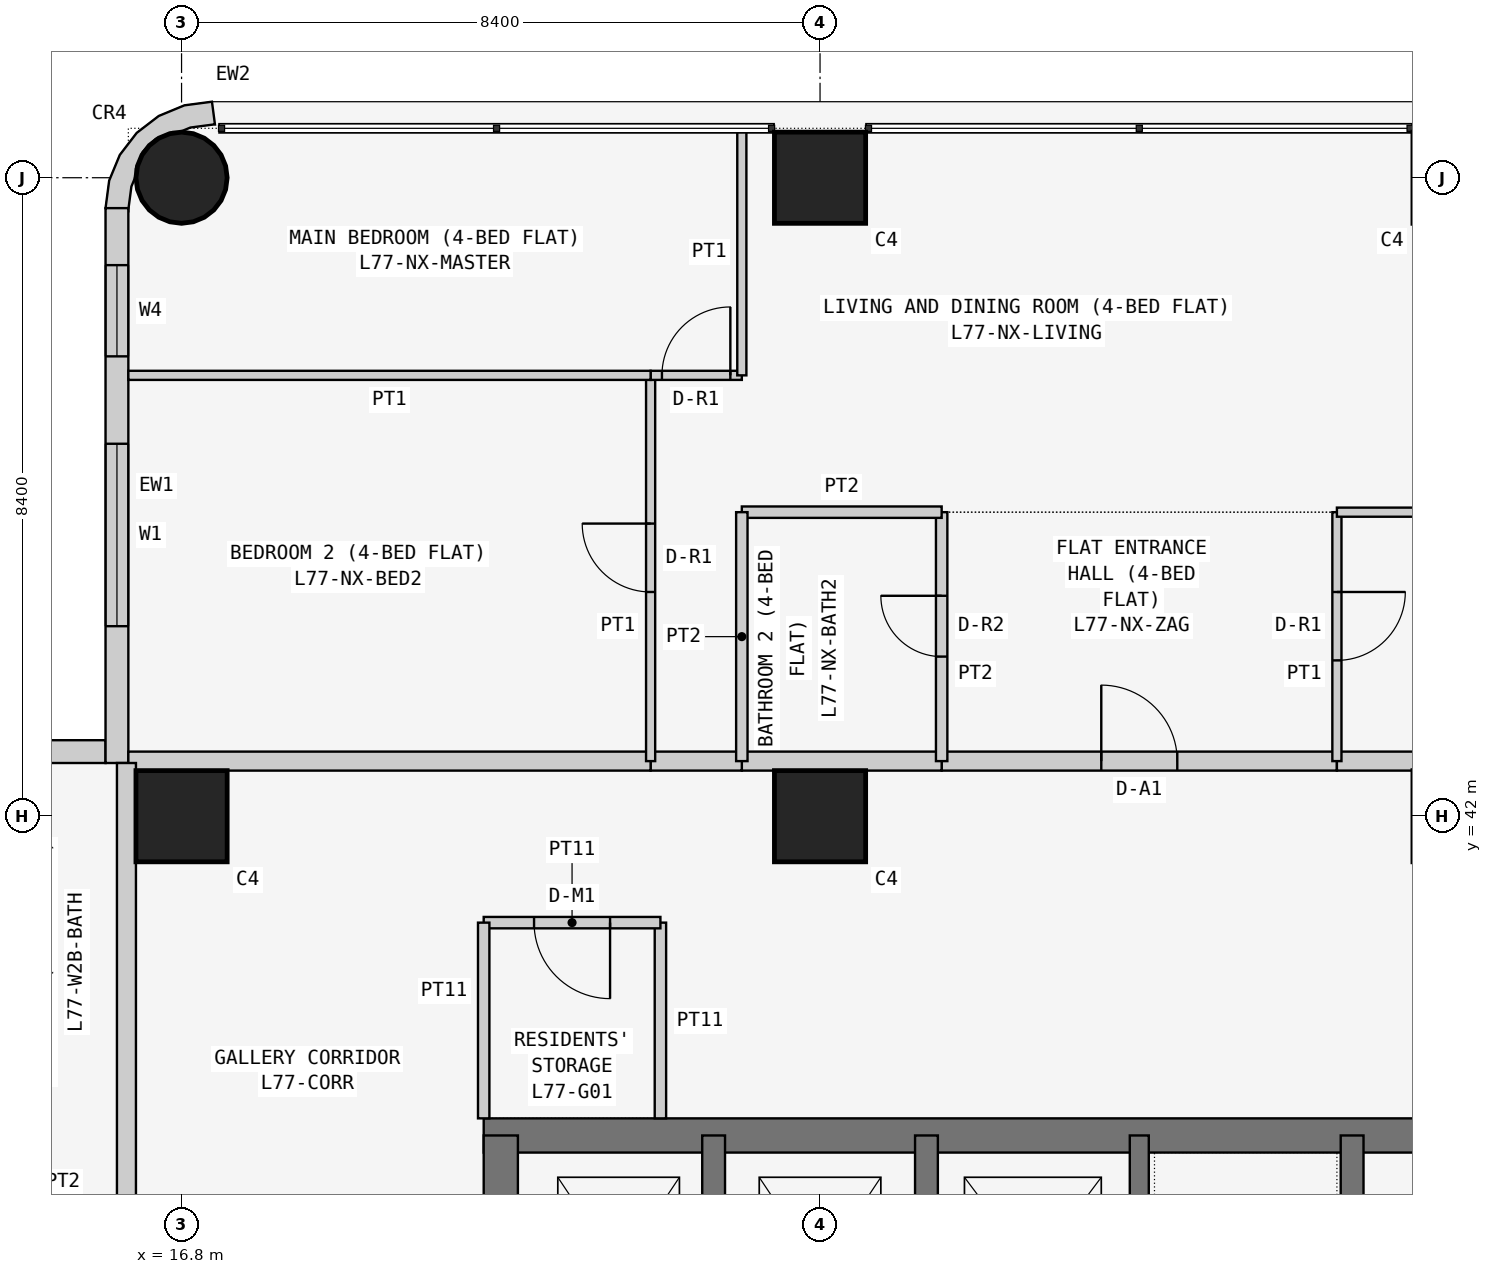
"""IFC4 building model, lengths in metres.
Left out: names, types, materials, properties, quantities, classifications, styles, units other than length and angle.
Written with IfcOpenShell. Run it as: python <this file> out.ifc"""

import sys

from ifc_helpers import new_model, si_unit, direction, frame, frame_2d, origin, origin_2d, place, context, subcontext, project, spatial, polyline, rectangle, circle, outline, extrude, element, fill, save


model = new_model("IFC4")
c1 = context("Model", 3, precision=1e-05, world=origin(), true_north=direction((0.0, 1.0)))
c2 = subcontext(c1, "Body", "Model", "MODEL_VIEW")
j1 = project(units=[si_unit("LENGTHUNIT", "METRE"), si_unit("PLANEANGLEUNIT", "RADIAN")], contexts=[c1])
p1 = place(None, origin())
s1 = spatial("IfcSite", under=j1, at=p1, CompositionType="ELEMENT")
p2 = place(p1, origin())
s2 = spatial("IfcBuilding", under=s1, at=p2, CompositionType="ELEMENT")
p3 = place(p2, frame((0.0, 0.0, 293.7)))
s3 = spatial("IfcBuildingStorey", under=s2, at=p3, CompositionType="ELEMENT", Elevation=293.7)
p4 = place(p3, frame((16.8, 42.0, 0.0), z_axis=(0.0, 0.0, 1.0), x_axis=(1.0, 0.0, 0.0)))
e1 = element("IfcColumn", 1, at=p4, inside=s3, PredefinedType="COLUMN", context=c2, shape_type="SweptSolid", body=[
    extrude(rectangle(XDim=1.2, YDim=1.2, at=origin_2d()), origin(), (0.0, 0.0, 1.0), 3.6),
])
p5 = place(p3, frame((16.8, 50.4, 0.0), z_axis=(0.0, 0.0, 1.0), x_axis=(1.0, 0.0, 0.0)))
e2 = element("IfcColumn", 2, at=p5, inside=s3, PredefinedType="COLUMN", context=c2, shape_type="SweptSolid", body=[
    extrude(circle(Radius=0.6, at=origin_2d()), origin(), (0.0, 0.0, 1.0), 3.6),
])
for number, where, z_axis, x_axis in (
    (3, (25.2, 42.0, 0.0), (0.0, 0.0, 1.0), (1.0, 0.0, 0.0)),
    (4, (25.2, 50.4, 0.0), (0.0, 0.0, 1.0), (1.0, 0.0, 0.0)),
):
    element("IfcColumn", number, at=place(p3, frame(where, z_axis=z_axis, x_axis=x_axis)), inside=s3, PredefinedType="COLUMN", context=c2, shape_type="SweptSolid", body=[
        extrude(rectangle(XDim=1.2, YDim=1.2, at=origin_2d()), origin(), (0.0, 0.0, 1.0), 3.6),
    ])
p6 = place(p3, frame((37.8, 37.8, 0.0), z_axis=(0.0, 0.0, 1.0), x_axis=(-1.0, 0.0, 0.0)))
e5 = element("IfcWall", 5, at=p6, inside=s3, PredefinedType="SHEAR", context=c2, shape_type="SweptSolid", body=[
    extrude(rectangle(XDim=17.025, YDim=0.45, at=frame_2d((8.513, 0.0))), origin(), (0.0, 0.0, 1.0), 3.6),
])
p7 = place(p3, frame((21.0, 37.8, 0.0), z_axis=(0.0, 0.0, 1.0), x_axis=(0.0, -1.0, 0.0)))
e6 = element("IfcWall", 6, at=p7, inside=s3, PredefinedType="SHEAR", context=c2, shape_type="SweptSolid", body=[
    extrude(rectangle(XDim=17.025, YDim=0.45, at=frame_2d((8.513, 0.0))), origin(), (0.0, 0.0, 1.0), 3.6),
])
p8 = place(p7, frame((5.4, 0.0, 0.0)))
e7 = element("IfcOpeningElement", 7, at=p8, cuts=e6, PredefinedType="OPENING", context=c2, shape_type="SweptSolid", body=[
    extrude(rectangle(XDim=1.2, YDim=2.1, at=frame_2d((0.6, 1.05))), frame((0.0, 0.235, 0.0), z_axis=(0.0, -1.0, 0.0), x_axis=(1.0, 0.0, 0.0)), (0.0, 0.0, 1.0), 0.47),
])
p9 = place(p3, frame((26.6, 21.0, 0.0), z_axis=(0.0, 0.0, 1.0), x_axis=(0.0, 1.0, 0.0)))
e8 = element("IfcWall", 8, at=p9, inside=s3, PredefinedType="SHEAR", context=c2, shape_type="SweptSolid", body=[
    extrude(rectangle(XDim=16.8, YDim=0.3, at=frame_2d((8.4, 0.0))), origin(), (0.0, 0.0, 1.0), 3.6),
])
p10 = place(p9, frame((10.4, 0.0, 0.0)))
e9 = element("IfcOpeningElement", 9, at=p10, cuts=e8, PredefinedType="OPENING", context=c2, shape_type="SweptSolid", body=[
    extrude(rectangle(XDim=1.2, YDim=2.1, at=frame_2d((0.6, 1.05))), frame((0.0, 0.16, 0.0), z_axis=(0.0, -1.0, 0.0), x_axis=(1.0, 0.0, 0.0)), (0.0, 0.0, 1.0), 0.32),
])
p11 = place(p3, frame((23.8, 34.6, 0.0), z_axis=(0.0, 0.0, 1.0), x_axis=(0.0, 1.0, 0.0)))
e10 = element("IfcWall", 10, at=p11, inside=s3, PredefinedType="SHEAR", context=c2, shape_type="SweptSolid", body=[
    extrude(rectangle(XDim=3.2, YDim=0.3, at=frame_2d((1.6, 0.0))), origin(), (0.0, 0.0, 1.0), 3.6),
])
p12 = place(p3, frame((32.2, 29.25, 0.0), z_axis=(0.0, 0.0, 1.0), x_axis=(0.0, 1.0, 0.0)))
e11 = element("IfcWall", 11, at=p12, inside=s3, PredefinedType="SHEAR", context=c2, shape_type="SweptSolid", body=[
    extrude(rectangle(XDim=8.55, YDim=0.3, at=frame_2d((4.275, 0.0))), origin(), (0.0, 0.0, 1.0), 3.6),
])
p13 = place(p3, frame((29.4, 34.6, 0.0), z_axis=(0.0, 0.0, 1.0), x_axis=(0.0, 1.0, 0.0)))
e12 = element("IfcWall", 12, at=p13, inside=s3, PredefinedType="SHEAR", context=c2, shape_type="SweptSolid", body=[
    extrude(rectangle(XDim=3.2, YDim=0.25, at=frame_2d((1.6, 0.0))), origin(), (0.0, 0.0, 1.0), 3.6),
])
p14 = place(p3, frame((15.8, 42.85, 0.0), z_axis=(0.0, 0.0, 1.0), x_axis=(-1.0, 0.0, 0.0)))
e13 = element("IfcWall", 13, at=p14, inside=s3, PredefinedType="SOLIDWALL", context=c2, shape_type="SweptSolid", body=[
    extrude(rectangle(XDim=7.0, YDim=0.3, at=frame_2d((3.5, 0.0))), origin(), (0.0, 0.0, 1.0), 3.45),
])
p15 = place(p14, frame((1.5, 0.0, 0.9)))
e14 = element("IfcOpeningElement", 14, at=p15, cuts=e13, PredefinedType="OPENING", context=c2, shape_type="SweptSolid", body=[
    extrude(rectangle(XDim=2.4, YDim=1.5, at=frame_2d((1.2, 0.75))), frame((0.0, 0.16, 0.0), z_axis=(0.0, -1.0, 0.0), x_axis=(1.0, 0.0, 0.0)), (0.0, 0.0, 1.0), 0.32),
])
p16 = place(p14, frame((5.05, 0.0, 0.9)))
e15 = element("IfcOpeningElement", 15, at=p16, cuts=e13, PredefinedType="OPENING", context=c2, shape_type="SweptSolid", body=[
    extrude(rectangle(XDim=1.2, YDim=1.5, at=frame_2d((0.6, 0.75))), frame((0.0, 0.16, 0.0), z_axis=(0.0, -1.0, 0.0), x_axis=(1.0, 0.0, 0.0)), (0.0, 0.0, 1.0), 0.32),
])
p17 = place(p3, frame((15.95, 50.0, 0.0), z_axis=(0.0, 0.0, 1.0), x_axis=(0.0, -1.0, 0.0)))
e16 = element("IfcWall", 16, at=p17, inside=s3, PredefinedType="SOLIDWALL", context=c2, shape_type="SweptSolid", body=[
    extrude(rectangle(XDim=7.3, YDim=0.3, at=frame_2d((3.65, 0.0))), origin(), (0.0, 0.0, 1.0), 3.45),
])
p18 = place(p17, frame((3.1, 0.0, 0.9)))
e17 = element("IfcOpeningElement", 17, at=p18, cuts=e16, PredefinedType="OPENING", context=c2, shape_type="SweptSolid", body=[
    extrude(rectangle(XDim=2.4, YDim=1.5, at=frame_2d((1.2, 0.75))), frame((0.0, 0.16, 0.0), z_axis=(0.0, -1.0, 0.0), x_axis=(1.0, 0.0, 0.0)), (0.0, 0.0, 1.0), 0.32),
])
p19 = place(p17, frame((0.75, 0.0, 0.9)))
e18 = element("IfcOpeningElement", 18, at=p19, cuts=e16, PredefinedType="OPENING", context=c2, shape_type="SweptSolid", body=[
    extrude(rectangle(XDim=1.2, YDim=1.5, at=frame_2d((0.6, 0.75))), frame((0.0, 0.16, 0.0), z_axis=(0.0, -1.0, 0.0), x_axis=(1.0, 0.0, 0.0)), (0.0, 0.0, 1.0), 0.32),
])
p20 = place(p3, frame((17.162, 50.976, 0.0), z_axis=(0.0, 0.0, 1.0), x_axis=(-0.707106781187, 0.707106781187, 0.0)))
e19 = element("IfcWall", 19, at=p20, inside=s3, PredefinedType="SOLIDWALL", context=c2, shape_type="SweptSolid", body=[
    extrude(outline(polyline([(0.047, -0.129), (0.033, -0.143), (0.273, -0.327), (0.495, -0.037), (0.635, 0.301), (0.683, 0.663), (0.635, 1.025), (0.495, 1.363), (0.273, 1.653), (0.033, 1.469), (0.047, 1.455), (0.233, 1.212), (0.292, 1.069), (0.358, 1.003), (0.449, 0.782), (0.449, 0.543), (0.358, 0.322), (0.292, 0.257), (0.233, 0.114), (0.047, -0.129)])), origin(), (0.0, 0.0, 1.0), 3.45),
])
p21 = place(p3, frame((23.1, 38.025, 0.0), z_axis=(0.0, 0.0, 1.0), x_axis=(0.0, 1.0, 0.0)))
e20 = element("IfcWall", 20, at=p21, inside=s3, PredefinedType="PARTITIONING", context=c2, shape_type="SweptSolid", body=[
    extrude(rectangle(XDim=2.575, YDim=0.15, at=frame_2d((1.288, 0.0))), origin(), (0.0, 0.0, 1.0), 3.45),
])
p22 = place(p3, frame((23.1, 40.6, 0.0), z_axis=(0.0, 0.0, 1.0), x_axis=(-1.0, 0.0, 0.0)))
e21 = element("IfcWall", 21, at=p22, inside=s3, PredefinedType="PARTITIONING", context=c2, shape_type="SweptSolid", body=[
    extrude(rectangle(XDim=2.325, YDim=0.15, at=frame_2d((1.163, 0.0))), origin(), (0.0, 0.0, 1.0), 3.45),
])
p23 = place(p22, frame((0.663, 0.0, 0.0)))
e22 = element("IfcOpeningElement", 22, at=p23, cuts=e21, PredefinedType="OPENING", context=c2, shape_type="SweptSolid", body=[
    extrude(rectangle(XDim=1.0, YDim=2.1, at=frame_2d((0.5, 1.05))), frame((0.0, 0.085, 0.0), z_axis=(0.0, -1.0, 0.0), x_axis=(1.0, 0.0, 0.0)), (0.0, 0.0, 1.0), 0.17),
])
p24 = place(p3, frame((20.775, 40.6, 0.0), z_axis=(0.0, 0.0, 1.0), x_axis=(0.0, -1.0, 0.0)))
e23 = element("IfcWall", 23, at=p24, inside=s3, PredefinedType="PARTITIONING", context=c2, shape_type="SweptSolid", body=[
    extrude(rectangle(XDim=2.575, YDim=0.15, at=frame_2d((1.288, 0.0))), origin(), (0.0, 0.0, 1.0), 3.45),
])
p25 = place(p3, frame((26.8, 42.725, 0.0), z_axis=(0.0, 0.0, 1.0), x_axis=(1.0, 0.0, 0.0)))
e24 = element("IfcWall", 24, at=p25, inside=s3, PredefinedType="PARTITIONING", context=c2, shape_type="SweptSolid", body=[
    extrude(rectangle(XDim=5.2, YDim=0.25, at=frame_2d((2.6, 0.0))), origin(), (0.0, 0.0, 1.0), 3.45),
])
p26 = place(p25, frame((2.1, 0.0, 0.0)))
e25 = element("IfcOpeningElement", 25, at=p26, cuts=e24, PredefinedType="OPENING", context=c2, shape_type="SweptSolid", body=[
    extrude(rectangle(XDim=1.0, YDim=2.1, at=frame_2d((0.5, 1.05))), frame((0.0, 0.135, 0.0), z_axis=(0.0, -1.0, 0.0), x_axis=(1.0, 0.0, 0.0)), (0.0, 0.0, 1.0), 0.27),
])
p27 = place(p3, frame((24.171, 42.725, 0.0), z_axis=(0.0, 0.0, 1.0), x_axis=(1.0, 0.0, 0.0)))
e26 = element("IfcWall", 26, at=p27, inside=s3, PredefinedType="PARTITIONING", context=c2, shape_type="SweptSolid", body=[
    extrude(rectangle(XDim=2.629, YDim=0.25, at=frame_2d((1.314, 0.0))), origin(), (0.0, 0.0, 1.0), 3.45),
])
p28 = place(p3, frame((32.0, 42.725, 0.0), z_axis=(0.0, 0.0, 1.0), x_axis=(1.0, 0.0, 0.0)))
e27 = element("IfcWall", 27, at=p28, inside=s3, PredefinedType="PARTITIONING", context=c2, shape_type="SweptSolid", body=[
    extrude(rectangle(XDim=2.629, YDim=0.25, at=frame_2d((1.314, 0.0))), origin(), (0.0, 0.0, 1.0), 3.45),
])
p29 = place(p3, frame((22.971, 42.725, 0.0), z_axis=(0.0, 0.0, 1.0), x_axis=(1.0, 0.0, 0.0)))
e28 = element("IfcWall", 28, at=p29, inside=s3, PredefinedType="PARTITIONING", context=c2, shape_type="SweptSolid", body=[
    extrude(rectangle(XDim=1.2, YDim=0.25, at=frame_2d((0.6, 0.0))), origin(), (0.0, 0.0, 1.0), 3.45),
])
p30 = place(p3, frame((16.1, 42.725, 0.0), z_axis=(0.0, 0.0, 1.0), x_axis=(1.0, 0.0, 0.0)))
e29 = element("IfcWall", 29, at=p30, inside=s3, PredefinedType="PARTITIONING", context=c2, shape_type="SweptSolid", body=[
    extrude(rectangle(XDim=6.871, YDim=0.25, at=frame_2d((3.436, 0.0))), origin(), (0.0, 0.0, 1.0), 3.45),
])
p31 = place(p3, frame((16.075, 36.229, 0.0), z_axis=(0.0, 0.0, 1.0), x_axis=(0.0, 1.0, 0.0)))
e30 = element("IfcWall", 30, at=p31, inside=s3, PredefinedType="PARTITIONING", context=c2, shape_type="SweptSolid", body=[
    extrude(rectangle(XDim=6.471, YDim=0.25, at=frame_2d((3.235, 0.0))), origin(), (0.0, 0.0, 1.0), 3.45),
])
p32 = place(p3, frame((26.8, 46.0, 0.0), z_axis=(0.0, 0.0, 1.0), x_axis=(0.0, -1.0, 0.0)))
e31 = element("IfcWall", 31, at=p32, inside=s3, PredefinedType="PARTITIONING", context=c2, shape_type="SweptSolid", body=[
    extrude(rectangle(XDim=3.275, YDim=0.15, at=frame_2d((1.637, 0.0))), origin(), (0.0, 0.0, 1.0), 3.45),
])
p33 = place(p32, frame((1.1, 0.0, 0.0)))
e32 = element("IfcOpeningElement", 32, at=p33, cuts=e31, PredefinedType="OPENING", context=c2, shape_type="SweptSolid", body=[
    extrude(rectangle(XDim=0.8, YDim=2.1, at=frame_2d((0.4, 1.05))), frame((0.0, 0.085, 0.0), z_axis=(0.0, -1.0, 0.0), x_axis=(1.0, 0.0, 0.0)), (0.0, 0.0, 1.0), 0.17),
])
p34 = place(p3, frame((32.0, 42.725, 0.0), z_axis=(0.0, 0.0, 1.0), x_axis=(0.0, 1.0, 0.0)))
e33 = element("IfcWall", 33, at=p34, inside=s3, PredefinedType="PARTITIONING", context=c2, shape_type="SweptSolid", body=[
    extrude(rectangle(XDim=3.275, YDim=0.12, at=frame_2d((1.637, 0.0))), origin(), (0.0, 0.0, 1.0), 3.45),
])
p35 = place(p34, frame((1.325, 0.0, 0.0)))
e34 = element("IfcOpeningElement", 34, at=p35, cuts=e33, PredefinedType="OPENING", context=c2, shape_type="SweptSolid", body=[
    extrude(rectangle(XDim=0.9, YDim=2.1, at=frame_2d((0.45, 1.05))), frame((0.0, 0.07, 0.0), z_axis=(0.0, -1.0, 0.0), x_axis=(1.0, 0.0, 0.0)), (0.0, 0.0, 1.0), 0.14),
])
p36 = place(p3, frame((26.8, 46.0, 0.0), z_axis=(0.0, 0.0, 1.0), x_axis=(-1.0, 0.0, 0.0)))
e35 = element("IfcWall", 35, at=p36, inside=s3, PredefinedType="PARTITIONING", context=c2, shape_type="SweptSolid", body=[
    extrude(rectangle(XDim=2.629, YDim=0.15, at=frame_2d((1.314, 0.0))), origin(), (0.0, 0.0, 1.0), 3.45),
])
p37 = place(p3, frame((24.171, 46.0, 0.0), z_axis=(0.0, 0.0, 1.0), x_axis=(0.0, -1.0, 0.0)))
e36 = element("IfcWall", 36, at=p37, inside=s3, PredefinedType="PARTITIONING", context=c2, shape_type="SweptSolid", body=[
    extrude(rectangle(XDim=3.275, YDim=0.15, at=frame_2d((1.637, 0.0))), origin(), (0.0, 0.0, 1.0), 3.45),
])
p38 = place(p3, frame((34.629, 46.0, 0.0), z_axis=(0.0, 0.0, 1.0), x_axis=(-1.0, 0.0, 0.0)))
e37 = element("IfcWall", 37, at=p38, inside=s3, PredefinedType="PARTITIONING", context=c2, shape_type="SweptSolid", body=[
    extrude(rectangle(XDim=2.629, YDim=0.12, at=frame_2d((1.314, 0.0))), origin(), (0.0, 0.0, 1.0), 3.45),
])
p39 = place(p3, frame((22.971, 42.725, 0.0), z_axis=(0.0, 0.0, 1.0), x_axis=(0.0, 1.0, 0.0)))
e38 = element("IfcWall", 38, at=p39, inside=s3, PredefinedType="PARTITIONING", context=c2, shape_type="SweptSolid", body=[
    extrude(rectangle(XDim=5.075, YDim=0.12, at=frame_2d((2.538, 0.0))), origin(), (0.0, 0.0, 1.0), 3.45),
])
p40 = place(p39, frame((2.225, 0.0, 0.0)))
e39 = element("IfcOpeningElement", 39, at=p40, cuts=e38, PredefinedType="OPENING", context=c2, shape_type="SweptSolid", body=[
    extrude(rectangle(XDim=0.9, YDim=2.1, at=frame_2d((0.45, 1.05))), frame((0.0, 0.07, 0.0), z_axis=(0.0, -1.0, 0.0), x_axis=(1.0, 0.0, 0.0)), (0.0, 0.0, 1.0), 0.14),
])
p41 = place(p3, frame((22.971, 47.8, 0.0), z_axis=(0.0, 0.0, 1.0), x_axis=(1.0, 0.0, 0.0)))
e40 = element("IfcWall", 40, at=p41, inside=s3, PredefinedType="PARTITIONING", context=c2, shape_type="SweptSolid", body=[
    extrude(rectangle(XDim=1.2, YDim=0.12, at=frame_2d((0.6, 0.0))), origin(), (0.0, 0.0, 1.0), 3.45),
])
p42 = place(p41, frame((0.149, 0.0, 0.0)))
e41 = element("IfcOpeningElement", 41, at=p42, cuts=e40, PredefinedType="OPENING", context=c2, shape_type="SweptSolid", body=[
    extrude(rectangle(XDim=0.9, YDim=2.1, at=frame_2d((0.45, 1.05))), frame((0.0, 0.07, 0.0), z_axis=(0.0, -1.0, 0.0), x_axis=(1.0, 0.0, 0.0)), (0.0, 0.0, 1.0), 0.14),
])
p43 = place(p3, frame((24.171, 47.8, 0.0), z_axis=(0.0, 0.0, 1.0), x_axis=(0.0, 1.0, 0.0)))
e42 = element("IfcWall", 42, at=p43, inside=s3, PredefinedType="PARTITIONING", context=c2, shape_type="SweptSolid", body=[
    extrude(rectangle(XDim=3.25, YDim=0.12, at=frame_2d((1.625, 0.0))), origin(), (0.0, 0.0, 1.0), 3.45),
])
p44 = place(p3, frame((22.971, 47.8, 0.0), z_axis=(0.0, 0.0, 1.0), x_axis=(-1.0, 0.0, 0.0)))
e43 = element("IfcWall", 43, at=p44, inside=s3, PredefinedType="PARTITIONING", context=c2, shape_type="SweptSolid", body=[
    extrude(rectangle(XDim=6.871, YDim=0.12, at=frame_2d((3.436, 0.0))), origin(), (0.0, 0.0, 1.0), 3.45),
])
p45 = place(p18, origin())
e44 = element("IfcWindow", 44, at=p45, inside=s3, PartitioningType="SINGLE_PANEL", PredefinedType="WINDOW", context=c2, shape_type="SweptSolid", body=[
    extrude(rectangle(XDim=2.4, YDim=1.5, at=frame_2d((1.2, 0.75))), frame((0.0, 0.03, 0.0), z_axis=(0.0, -1.0, 0.0), x_axis=(1.0, 0.0, 0.0)), (0.0, 0.0, 1.0), 0.06),
])
fill(e17, e44)
p46 = place(p19, origin())
e45 = element("IfcWindow", 45, at=p46, inside=s3, PartitioningType="SINGLE_PANEL", PredefinedType="WINDOW", context=c2, shape_type="SweptSolid", body=[
    extrude(rectangle(XDim=1.2, YDim=1.5, at=frame_2d((0.6, 0.75))), frame((0.0, 0.03, 0.0), z_axis=(0.0, -1.0, 0.0), x_axis=(1.0, 0.0, 0.0)), (0.0, 0.0, 1.0), 0.06),
])
fill(e18, e45)
p47 = place(p23, origin())
e46 = element("IfcDoor", 46, at=p47, inside=s3, OperationType="SINGLE_SWING_LEFT", PredefinedType="DOOR", context=c2, shape_type="SweptSolid", body=[
    extrude(rectangle(XDim=1.0, YDim=2.1, at=frame_2d((0.5, 1.05))), frame((0.0, 0.025, 0.0), z_axis=(0.0, -1.0, 0.0), x_axis=(1.0, 0.0, 0.0)), (0.0, 0.0, 1.0), 0.05),
])
fill(e22, e46)
p48 = place(p26, origin())
e47 = element("IfcDoor", 47, at=p48, inside=s3, OperationType="SINGLE_SWING_LEFT", PredefinedType="DOOR", context=c2, shape_type="SweptSolid", body=[
    extrude(rectangle(XDim=1.0, YDim=2.1, at=frame_2d((0.5, 1.05))), frame((0.0, 0.025, 0.0), z_axis=(0.0, -1.0, 0.0), x_axis=(1.0, 0.0, 0.0)), (0.0, 0.0, 1.0), 0.05),
])
fill(e25, e47)
p49 = place(p33, frame((0.8, 0.0, 0.0), z_axis=(0.0, 0.0, 1.0), x_axis=(-1.0, 0.0, 0.0)))
e48 = element("IfcDoor", 48, at=p49, inside=s3, OperationType="SINGLE_SWING_RIGHT", PredefinedType="DOOR", context=c2, shape_type="SweptSolid", body=[
    extrude(rectangle(XDim=0.8, YDim=2.1, at=frame_2d((0.4, 1.05))), frame((0.0, 0.025, 0.0), z_axis=(0.0, -1.0, 0.0), x_axis=(1.0, 0.0, 0.0)), (0.0, 0.0, 1.0), 0.05),
])
fill(e32, e48)
p50 = place(p35, frame((0.9, 0.0, 0.0), z_axis=(0.0, 0.0, 1.0), x_axis=(-1.0, 0.0, 0.0)))
e49 = element("IfcDoor", 49, at=p50, inside=s3, OperationType="SINGLE_SWING_LEFT", PredefinedType="DOOR", context=c2, shape_type="SweptSolid", body=[
    extrude(rectangle(XDim=0.9, YDim=2.1, at=frame_2d((0.45, 1.05))), frame((0.0, 0.025, 0.0), z_axis=(0.0, -1.0, 0.0), x_axis=(1.0, 0.0, 0.0)), (0.0, 0.0, 1.0), 0.05),
])
fill(e34, e49)
p51 = place(p40, origin())
e50 = element("IfcDoor", 50, at=p51, inside=s3, OperationType="SINGLE_SWING_RIGHT", PredefinedType="DOOR", context=c2, shape_type="SweptSolid", body=[
    extrude(rectangle(XDim=0.9, YDim=2.1, at=frame_2d((0.45, 1.05))), frame((0.0, 0.025, 0.0), z_axis=(0.0, -1.0, 0.0), x_axis=(1.0, 0.0, 0.0)), (0.0, 0.0, 1.0), 0.05),
])
fill(e39, e50)
p52 = place(p42, origin())
e51 = element("IfcDoor", 51, at=p52, inside=s3, OperationType="SINGLE_SWING_RIGHT", PredefinedType="DOOR", context=c2, shape_type="SweptSolid", body=[
    extrude(rectangle(XDim=0.9, YDim=2.1, at=frame_2d((0.45, 1.05))), frame((0.0, 0.025, 0.0), z_axis=(0.0, -1.0, 0.0), x_axis=(1.0, 0.0, 0.0)), (0.0, 0.0, 1.0), 0.05),
])
fill(e41, e51)
save(model, sys.argv[1])
